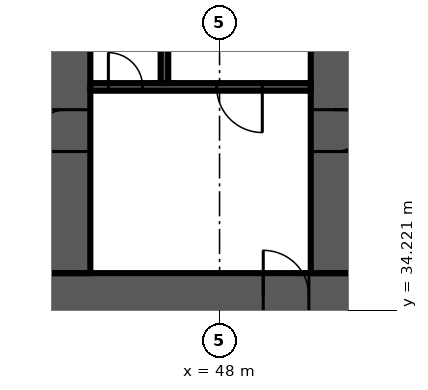
"""IFC4 building model, lengths in metres.
Left out: names, types, materials, properties, quantities, classifications, styles, units other than length and angle.
Written with IfcOpenShell. Run it as: python <this file> out.ifc"""

import sys

from ifc_helpers import new_model, si_unit, direction, frame, frame_2d, origin, place, context, subcontext, project, spatial, rectangle, extrude, element, fill, save


model = new_model("IFC4")
c1 = context("Model", 3, precision=1e-05, world=origin(), true_north=direction((0.0, 1.0)))
c2 = subcontext(c1, "Body", "Model", "MODEL_VIEW")
j1 = project(units=[si_unit("LENGTHUNIT", "METRE"), si_unit("PLANEANGLEUNIT", "RADIAN")], contexts=[c1])
p1 = place(None, origin())
s1 = spatial("IfcSite", under=j1, at=p1, CompositionType="ELEMENT")
p2 = place(p1, origin())
s2 = spatial("IfcBuilding", under=s1, at=p2, CompositionType="ELEMENT")
p3 = place(p2, frame((0.0, 0.0, 84.7)))
s3 = spatial("IfcBuildingStorey", under=s2, at=p3, CompositionType="ELEMENT", Elevation=84.7)
p4 = place(p3, frame((9.0, 34.6, 0.0), z_axis=(0.0, 0.0, 1.0), x_axis=(1.0, 0.0, 0.0)))
e1 = element("IfcWall", 1, at=p4, inside=s3, PredefinedType="SHEAR", context=c2, shape_type="SweptSolid", body=[
    extrude(rectangle(XDim=56.0, YDim=1.2, at=frame_2d((28.0, 0.0))), origin(), (0.0, 0.0, 1.0), 3.6),
])
p5 = place(p4, frame((3.3, 0.0, 0.0)))
e2 = element("IfcOpeningElement", 2, at=p5, cuts=e1, PredefinedType="OPENING", context=c2, shape_type="SweptSolid", body=[
    extrude(rectangle(XDim=1.0, YDim=2.1, at=frame_2d((0.5, 1.05))), frame((0.0, 0.61, 0.0), z_axis=(0.0, -1.0, 0.0), x_axis=(1.0, 0.0, 0.0)), (0.0, 0.0, 1.0), 1.22),
])
p6 = place(p4, frame((7.867, 0.0, 0.0)))
e3 = element("IfcOpeningElement", 3, at=p6, cuts=e1, PredefinedType="OPENING", context=c2, shape_type="SweptSolid", body=[
    extrude(rectangle(XDim=1.1, YDim=2.1, at=frame_2d((0.55, 1.05))), frame((0.0, 0.61, 0.0), z_axis=(0.0, -1.0, 0.0), x_axis=(1.0, 0.0, 0.0)), (0.0, 0.0, 1.0), 1.22),
])
p7 = place(p4, frame((12.033, 0.0, 0.0)))
e4 = element("IfcOpeningElement", 4, at=p7, cuts=e1, PredefinedType="OPENING", context=c2, shape_type="SweptSolid", body=[
    extrude(rectangle(XDim=1.1, YDim=2.1, at=frame_2d((0.55, 1.05))), frame((0.0, 0.61, 0.0), z_axis=(0.0, -1.0, 0.0), x_axis=(1.0, 0.0, 0.0)), (0.0, 0.0, 1.0), 1.22),
])
p8 = place(p4, frame((9.8, 0.0, 0.0)))
e5 = element("IfcOpeningElement", 5, at=p8, cuts=e1, PredefinedType="OPENING", context=c2, shape_type="SweptSolid", body=[
    extrude(rectangle(XDim=1.4, YDim=2.1, at=frame_2d((0.7, 1.05))), frame((0.0, 0.61, 0.0), z_axis=(0.0, -1.0, 0.0), x_axis=(1.0, 0.0, 0.0)), (0.0, 0.0, 1.0), 1.22),
])
p9 = place(p4, frame((14.65, 0.0, 0.0)))
e6 = element("IfcOpeningElement", 6, at=p9, cuts=e1, PredefinedType="OPENING", context=c2, shape_type="SweptSolid", body=[
    extrude(rectangle(XDim=1.2, YDim=2.1, at=frame_2d((0.6, 1.05))), frame((0.0, 0.61, 0.0), z_axis=(0.0, -1.0, 0.0), x_axis=(1.0, 0.0, 0.0)), (0.0, 0.0, 1.0), 1.22),
])
p10 = place(p4, frame((21.867, 0.0, 0.0)))
e7 = element("IfcOpeningElement", 7, at=p10, cuts=e1, PredefinedType="OPENING", context=c2, shape_type="SweptSolid", body=[
    extrude(rectangle(XDim=1.1, YDim=2.1, at=frame_2d((0.55, 1.05))), frame((0.0, 0.61, 0.0), z_axis=(0.0, -1.0, 0.0), x_axis=(1.0, 0.0, 0.0)), (0.0, 0.0, 1.0), 1.22),
])
p11 = place(p4, frame((26.033, 0.0, 0.0)))
e8 = element("IfcOpeningElement", 8, at=p11, cuts=e1, PredefinedType="OPENING", context=c2, shape_type="SweptSolid", body=[
    extrude(rectangle(XDim=1.1, YDim=2.1, at=frame_2d((0.55, 1.05))), frame((0.0, 0.61, 0.0), z_axis=(0.0, -1.0, 0.0), x_axis=(1.0, 0.0, 0.0)), (0.0, 0.0, 1.0), 1.22),
])
p12 = place(p4, frame((23.8, 0.0, 0.0)))
e9 = element("IfcOpeningElement", 9, at=p12, cuts=e1, PredefinedType="OPENING", context=c2, shape_type="SweptSolid", body=[
    extrude(rectangle(XDim=1.4, YDim=2.1, at=frame_2d((0.7, 1.05))), frame((0.0, 0.61, 0.0), z_axis=(0.0, -1.0, 0.0), x_axis=(1.0, 0.0, 0.0)), (0.0, 0.0, 1.0), 1.22),
])
p13 = place(p4, frame((28.867, 0.0, 0.0)))
e10 = element("IfcOpeningElement", 10, at=p13, cuts=e1, PredefinedType="OPENING", context=c2, shape_type="SweptSolid", body=[
    extrude(rectangle(XDim=1.1, YDim=2.1, at=frame_2d((0.55, 1.05))), frame((0.0, 0.61, 0.0), z_axis=(0.0, -1.0, 0.0), x_axis=(1.0, 0.0, 0.0)), (0.0, 0.0, 1.0), 1.22),
])
p14 = place(p4, frame((33.033, 0.0, 0.0)))
e11 = element("IfcOpeningElement", 11, at=p14, cuts=e1, PredefinedType="OPENING", context=c2, shape_type="SweptSolid", body=[
    extrude(rectangle(XDim=1.1, YDim=2.1, at=frame_2d((0.55, 1.05))), frame((0.0, 0.61, 0.0), z_axis=(0.0, -1.0, 0.0), x_axis=(1.0, 0.0, 0.0)), (0.0, 0.0, 1.0), 1.22),
])
p15 = place(p4, frame((40.15, 0.0, 0.0)))
e12 = element("IfcOpeningElement", 12, at=p15, cuts=e1, PredefinedType="OPENING", context=c2, shape_type="SweptSolid", body=[
    extrude(rectangle(XDim=1.2, YDim=2.1, at=frame_2d((0.6, 1.05))), frame((0.0, 0.61, 0.0), z_axis=(0.0, -1.0, 0.0), x_axis=(1.0, 0.0, 0.0)), (0.0, 0.0, 1.0), 1.22),
])
p16 = place(p4, frame((44.8, 0.0, 0.0)))
e13 = element("IfcOpeningElement", 13, at=p16, cuts=e1, PredefinedType="OPENING", context=c2, shape_type="SweptSolid", body=[
    extrude(rectangle(XDim=1.4, YDim=2.1, at=frame_2d((0.7, 1.05))), frame((0.0, 0.61, 0.0), z_axis=(0.0, -1.0, 0.0), x_axis=(1.0, 0.0, 0.0)), (0.0, 0.0, 1.0), 1.22),
])
p17 = place(p4, frame((49.867, 0.0, 0.0)))
e14 = element("IfcOpeningElement", 14, at=p17, cuts=e1, PredefinedType="OPENING", context=c2, shape_type="SweptSolid", body=[
    extrude(rectangle(XDim=1.1, YDim=2.1, at=frame_2d((0.55, 1.05))), frame((0.0, 0.61, 0.0), z_axis=(0.0, -1.0, 0.0), x_axis=(1.0, 0.0, 0.0)), (0.0, 0.0, 1.0), 1.22),
])
p18 = place(p4, frame((53.5, 0.0, 0.0)))
e15 = element("IfcOpeningElement", 15, at=p18, cuts=e1, PredefinedType="OPENING", context=c2, shape_type="SweptSolid", body=[
    extrude(rectangle(XDim=1.1, YDim=2.1, at=frame_2d((0.55, 1.05))), frame((0.0, 0.61, 0.0), z_axis=(0.0, -1.0, 0.0), x_axis=(1.0, 0.0, 0.0)), (0.0, 0.0, 1.0), 1.22),
])
p19 = place(p4, frame((51.567, 0.0, 0.0)))
e16 = element("IfcOpeningElement", 16, at=p19, cuts=e1, PredefinedType="OPENING", context=c2, shape_type="SweptSolid", body=[
    extrude(rectangle(XDim=1.4, YDim=2.1, at=frame_2d((0.7, 1.05))), frame((0.0, 0.61, 0.0), z_axis=(0.0, -1.0, 0.0), x_axis=(1.0, 0.0, 0.0)), (0.0, 0.0, 1.0), 1.22),
])
p20 = place(p3, frame((44.0, 35.2, 0.0), z_axis=(0.0, 0.0, 1.0), x_axis=(0.0, 1.0, 0.0)))
e17 = element("IfcWall", 17, at=p20, inside=s3, PredefinedType="SHEAR", context=c2, shape_type="SweptSolid", body=[
    extrude(rectangle(XDim=14.168, YDim=1.2, at=frame_2d((7.084, 0.0))), origin(), (0.0, 0.0, 1.0), 3.6),
])
p21 = place(p20, frame((3.2, 0.0, 0.0)))
e18 = element("IfcOpeningElement", 18, at=p21, cuts=e17, PredefinedType="OPENING", context=c2, shape_type="SweptSolid", body=[
    extrude(rectangle(XDim=1.1, YDim=2.1, at=frame_2d((0.55, 1.05))), frame((0.0, 0.61, 0.0), z_axis=(0.0, -1.0, 0.0), x_axis=(1.0, 0.0, 0.0)), (0.0, 0.0, 1.0), 1.22),
])
p22 = place(p20, frame((9.6, 0.0, 0.0)))
e19 = element("IfcOpeningElement", 19, at=p22, cuts=e17, PredefinedType="OPENING", context=c2, shape_type="SweptSolid", body=[
    extrude(rectangle(XDim=1.0, YDim=2.1, at=frame_2d((0.5, 1.05))), frame((0.0, 0.61, 0.0), z_axis=(0.0, -1.0, 0.0), x_axis=(1.0, 0.0, 0.0)), (0.0, 0.0, 1.0), 1.22),
])
p23 = place(p3, frame((51.0, 35.2, 0.0), z_axis=(0.0, 0.0, 1.0), x_axis=(0.0, 1.0, 0.0)))
e20 = element("IfcWall", 20, at=p23, inside=s3, PredefinedType="SHEAR", context=c2, shape_type="SweptSolid", body=[
    extrude(rectangle(XDim=13.555, YDim=1.2, at=frame_2d((6.778, 0.0))), origin(), (0.0, 0.0, 1.0), 3.6),
])
p24 = place(p23, frame((3.2, 0.0, 0.0)))
e21 = element("IfcOpeningElement", 21, at=p24, cuts=e20, PredefinedType="OPENING", context=c2, shape_type="SweptSolid", body=[
    extrude(rectangle(XDim=1.1, YDim=2.1, at=frame_2d((0.55, 1.05))), frame((0.0, 0.61, 0.0), z_axis=(0.0, -1.0, 0.0), x_axis=(1.0, 0.0, 0.0)), (0.0, 0.0, 1.0), 1.22),
])
p25 = place(p3, frame((44.6, 40.1, 0.0), z_axis=(0.0, 0.0, 1.0), x_axis=(1.0, 0.0, 0.0)))
e22 = element("IfcWall", 22, at=p25, inside=s3, PredefinedType="SHEAR", context=c2, shape_type="SweptSolid", body=[
    extrude(rectangle(XDim=5.8, YDim=0.2, at=frame_2d((2.9, 0.0))), origin(), (0.0, 0.0, 1.0), 3.2),
])
p26 = place(p25, frame((3.325, 0.0, 0.0)))
e23 = element("IfcOpeningElement", 23, at=p26, cuts=e22, PredefinedType="OPENING", context=c2, shape_type="SweptSolid", body=[
    extrude(rectangle(XDim=1.2, YDim=2.1, at=frame_2d((0.6, 1.05))), frame((0.0, 0.11, 0.0), z_axis=(0.0, -1.0, 0.0), x_axis=(1.0, 0.0, 0.0)), (0.0, 0.0, 1.0), 0.22),
])
p27 = place(p25, frame((0.475, 0.0, 0.0)))
e24 = element("IfcOpeningElement", 24, at=p27, cuts=e22, PredefinedType="OPENING", context=c2, shape_type="SweptSolid", body=[
    extrude(rectangle(XDim=0.9, YDim=2.1, at=frame_2d((0.45, 1.05))), frame((0.0, 0.11, 0.0), z_axis=(0.0, -1.0, 0.0), x_axis=(1.0, 0.0, 0.0)), (0.0, 0.0, 1.0), 0.22),
])
p28 = place(p3, frame((46.55, 40.2, 0.0), z_axis=(0.0, 0.0, 1.0), x_axis=(0.0, 1.0, 0.0)))
e25 = element("IfcWall", 25, at=p28, inside=s3, PredefinedType="SHEAR", context=c2, shape_type="SweptSolid", body=[
    extrude(rectangle(XDim=7.2, YDim=0.2, at=frame_2d((3.6, 0.0))), origin(), (0.0, 0.0, 1.0), 3.2),
])
p29 = place(p26, origin())
e26 = element("IfcDoor", 26, at=p29, inside=s3, OperationType="SINGLE_SWING_RIGHT", PredefinedType="DOOR", context=c2, shape_type="SweptSolid", body=[
    extrude(rectangle(XDim=1.2, YDim=2.1, at=frame_2d((0.6, 1.05))), frame((0.0, 0.025, 0.0), z_axis=(0.0, -1.0, 0.0), x_axis=(1.0, 0.0, 0.0)), (0.0, 0.0, 1.0), 0.05),
])
fill(e23, e26)
p30 = place(p27, origin())
e27 = element("IfcDoor", 27, at=p30, inside=s3, OperationType="SINGLE_SWING_LEFT", PredefinedType="DOOR", context=c2, shape_type="SweptSolid", body=[
    extrude(rectangle(XDim=0.9, YDim=2.1, at=frame_2d((0.45, 1.05))), frame((0.0, 0.025, 0.0), z_axis=(0.0, -1.0, 0.0), x_axis=(1.0, 0.0, 0.0)), (0.0, 0.0, 1.0), 0.05),
])
fill(e24, e27)
p31 = place(p15, origin())
e28 = element("IfcDoor", 28, at=p31, inside=s3, OperationType="SINGLE_SWING_LEFT", PredefinedType="DOOR", context=c2, shape_type="SweptSolid", body=[
    extrude(rectangle(XDim=1.2, YDim=2.1, at=frame_2d((0.6, 1.05))), frame((0.0, 0.025, 0.0), z_axis=(0.0, -1.0, 0.0), x_axis=(1.0, 0.0, 0.0)), (0.0, 0.0, 1.0), 0.05),
])
fill(e12, e28)
p32 = place(p21, origin())
e29 = element("IfcDoor", 29, at=p32, inside=s3, OperationType="SINGLE_SWING_LEFT", PredefinedType="DOOR", context=c2, shape_type="SweptSolid", body=[
    extrude(rectangle(XDim=1.1, YDim=2.1, at=frame_2d((0.55, 1.05))), frame((0.0, 0.025, 0.0), z_axis=(0.0, -1.0, 0.0), x_axis=(1.0, 0.0, 0.0)), (0.0, 0.0, 1.0), 0.05),
])
fill(e18, e29)
p33 = place(p24, origin())
e30 = element("IfcDoor", 30, at=p33, inside=s3, OperationType="SINGLE_SWING_RIGHT", PredefinedType="DOOR", context=c2, shape_type="SweptSolid", body=[
    extrude(rectangle(XDim=1.1, YDim=2.1, at=frame_2d((0.55, 1.05))), frame((0.0, 0.025, 0.0), z_axis=(0.0, -1.0, 0.0), x_axis=(1.0, 0.0, 0.0)), (0.0, 0.0, 1.0), 0.05),
])
fill(e21, e30)
save(model, sys.argv[1])
